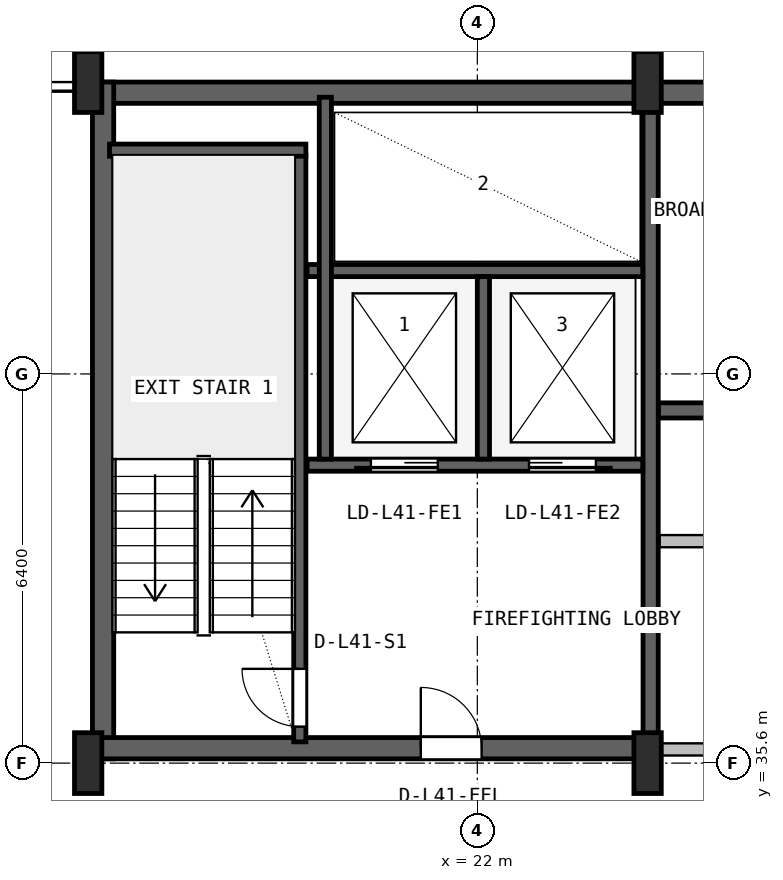
"""IFC4 building model, lengths in metres.
Left out: names, types, materials, properties, quantities, classifications, styles, units other than length and angle.
Written with IfcOpenShell. Run it as: python <this file> out.ifc"""

import sys

from ifc_helpers import new_model, si_unit, direction, frame, frame_2d, origin, origin_2d, place, context, subcontext, project, spatial, rectangle, i_section, extrude, source, transform, mapped, element, fill, save


model = new_model("IFC4")
c1 = context("Model", 3, precision=1e-05, world=origin(), true_north=direction((0.0, 1.0)))
c2 = subcontext(c1, "Body", "Model", "MODEL_VIEW")
j1 = project(units=[si_unit("LENGTHUNIT", "METRE"), si_unit("PLANEANGLEUNIT", "RADIAN")], contexts=[c1])
p1 = place(None, origin())
s1 = spatial("IfcSite", under=j1, at=p1, CompositionType="ELEMENT")
p2 = place(p1, origin())
s2 = spatial("IfcBuilding", under=s1, at=p2, CompositionType="ELEMENT")
p3 = place(p2, frame((0.0, 0.0, 168.6)))
s3 = spatial("IfcBuildingStorey", under=s2, at=p3, CompositionType="ELEMENT", Elevation=168.6)
p4 = place(p3, frame((15.6, 46.625, 0.0), z_axis=(0.0, 0.0, 1.0), x_axis=(1.0, 0.0, 0.0)))
e1 = element("IfcWall", 1, at=p4, inside=s3, PredefinedType="SHEAR", context=c2, shape_type="SweptSolid", body=[
    extrude(rectangle(XDim=36.8, YDim=0.35, at=frame_2d((18.4, 0.0))), origin(), (0.0, 0.0, 1.0), 3.55),
])
p5 = place(p3, frame((15.845, 35.67, 0.0), z_axis=(0.0, 0.0, 1.0), x_axis=(0.0, 1.0, 0.0)))
e2 = element("IfcWall", 2, at=p5, inside=s3, PredefinedType="SHEAR", context=c2, shape_type="SweptSolid", body=[
    extrude(rectangle(XDim=11.13, YDim=0.35, at=frame_2d((5.565, 0.0))), origin(), (0.0, 0.0, 1.0), 3.55),
])
p6 = place(p3, frame((15.67, 35.845, 0.0), z_axis=(0.0, 0.0, 1.0), x_axis=(1.0, 0.0, 0.0)))
e3 = element("IfcWall", 3, at=p6, inside=s3, PredefinedType="SHEAR", context=c2, shape_type="SweptSolid", body=[
    extrude(rectangle(XDim=9.13, YDim=0.35, at=frame_2d((4.565, 0.0))), origin(), (0.0, 0.0, 1.0), 3.55),
])
p7 = place(p6, frame((5.4, 0.0, 0.0)))
e4 = element("IfcOpeningElement", 4, at=p7, cuts=e3, PredefinedType="OPENING", context=c2, shape_type="SweptSolid", body=[
    extrude(rectangle(XDim=1.0, YDim=2.1, at=frame_2d((0.5, 1.05))), frame((0.0, 0.185, 0.0), z_axis=(0.0, -1.0, 0.0), x_axis=(1.0, 0.0, 0.0)), (0.0, 0.0, 1.0), 0.37),
])
m1 = source(origin(), c2, "Body", "SweptSolid", [
    extrude(i_section(OverallWidth=0.45, OverallDepth=1.0, WebThickness=0.016, FlangeThickness=0.03, FilletRadius=0.016, at=origin_2d()), origin(), (0.0, 0.0, 1.0), 3.8),
])
for number, where, z_axis, x_axis in (
    (5, (15.6, 35.6, 0.0), (0.0, 0.0, 1.0), (1.0, 0.0, 0.0)),
    (6, (15.6, 46.8, 0.0), (0.0, 0.0, 1.0), (1.0, 0.0, 0.0)),
    (7, (24.8, 35.6, 0.0), (0.0, 0.0, 1.0), (1.0, 0.0, 0.0)),
    (8, (24.8, 46.8, 0.0), (0.0, 0.0, 1.0), (1.0, 0.0, 0.0)),
):
    element("IfcColumn", number, at=place(p3, frame(where, z_axis=z_axis, x_axis=x_axis)), inside=s3, PredefinedType="COLUMN", context=c2, shape_type="MappedRepresentation", body=[
        mapped(m1, transform((0.0, 0.0, 0.0), x_axis=(1.0, 0.0, 0.0), y_axis=(0.0, 1.0, 0.0), z_axis=(0.0, 0.0, 1.0), scale=1.0)),
    ])
p8 = place(p3, frame((19.08, 35.95, 0.0), z_axis=(0.0, 0.0, 1.0), x_axis=(0.0, 1.0, 0.0)))
e9 = element("IfcWall", 9, at=p8, inside=s3, PredefinedType="SHEAR", context=c2, shape_type="SweptSolid", body=[
    extrude(rectangle(XDim=9.65, YDim=0.2, at=frame_2d((4.825, 0.0))), origin(), (0.0, 0.0, 1.0), 3.55),
])
p9 = place(p8, frame((0.25, 0.0, 0.0)))
e10 = element("IfcOpeningElement", 10, at=p9, cuts=e9, PredefinedType="OPENING", context=c2, shape_type="SweptSolid", body=[
    extrude(rectangle(XDim=0.95, YDim=2.1, at=frame_2d((0.475, 1.05))), frame((0.0, 0.11, 0.0), z_axis=(0.0, -1.0, 0.0), x_axis=(1.0, 0.0, 0.0)), (0.0, 0.0, 1.0), 0.22),
])
p10 = place(p3, frame((15.95, 45.68, 0.0), z_axis=(0.0, 0.0, 1.0), x_axis=(1.0, 0.0, 0.0)))
e11 = element("IfcWall", 11, at=p10, inside=s3, PredefinedType="SHEAR", context=c2, shape_type="SweptSolid", body=[
    extrude(rectangle(XDim=3.23, YDim=0.2, at=frame_2d((1.615, 0.0))), origin(), (0.0, 0.0, 1.0), 3.55),
])
p11 = place(p3, frame((24.85, 36.05, 0.0), z_axis=(0.0, 0.0, 1.0), x_axis=(0.0, 1.0, 0.0)))
e12 = element("IfcWall", 12, at=p11, inside=s3, PredefinedType="SHEAR", context=c2, shape_type="SweptSolid", body=[
    extrude(rectangle(XDim=10.45, YDim=0.25, at=frame_2d((5.225, 0.0))), origin(), (0.0, 0.0, 1.0), 3.55),
])
p12 = place(p3, frame((19.2, 40.5, 0.0), z_axis=(0.0, 0.0, 1.0), x_axis=(1.0, 0.0, 0.0)))
e13 = element("IfcWall", 13, at=p12, inside=s3, PredefinedType="SHEAR", context=c2, shape_type="SweptSolid", body=[
    extrude(rectangle(XDim=5.52, YDim=0.2, at=frame_2d((2.76, 0.0))), origin(), (0.0, 0.0, 1.0), 3.55),
])
p13 = place(p12, frame((1.05, 0.0, 0.0)))
e14 = element("IfcOpeningElement", 14, at=p13, cuts=e13, PredefinedType="OPENING", context=c2, shape_type="SweptSolid", body=[
    extrude(rectangle(XDim=1.1, YDim=2.18, at=frame_2d((0.55, 1.09))), frame((0.0, 0.11, 0.0), z_axis=(0.0, -1.0, 0.0), x_axis=(1.0, 0.0, 0.0)), (0.0, 0.0, 1.0), 0.22),
])
p14 = place(p12, frame((3.65, 0.0, 0.0)))
e15 = element("IfcOpeningElement", 15, at=p14, cuts=e13, PredefinedType="OPENING", context=c2, shape_type="SweptSolid", body=[
    extrude(rectangle(XDim=1.1, YDim=2.18, at=frame_2d((0.55, 1.09))), frame((0.0, 0.11, 0.0), z_axis=(0.0, -1.0, 0.0), x_axis=(1.0, 0.0, 0.0)), (0.0, 0.0, 1.0), 0.22),
])
p15 = place(p3, frame((19.2, 43.7, 0.0), z_axis=(0.0, 0.0, 1.0), x_axis=(1.0, 0.0, 0.0)))
e16 = element("IfcWall", 16, at=p15, inside=s3, PredefinedType="SHEAR", context=c2, shape_type="SweptSolid", body=[
    extrude(rectangle(XDim=5.52, YDim=0.2, at=frame_2d((2.76, 0.0))), origin(), (0.0, 0.0, 1.0), 3.55),
])
p16 = place(p3, frame((22.1, 40.6, 0.0), z_axis=(0.0, 0.0, 1.0), x_axis=(0.0, 1.0, 0.0)))
e17 = element("IfcWall", 17, at=p16, inside=s3, PredefinedType="SHEAR", context=c2, shape_type="SweptSolid", body=[
    extrude(rectangle(XDim=3.0, YDim=0.2, at=frame_2d((1.5, 0.0))), origin(), (0.0, 0.0, 1.0), 3.55),
])
p17 = place(p3, frame((19.5, 40.6, 0.0), z_axis=(0.0, 0.0, 1.0), x_axis=(0.0, 1.0, 0.0)))
e18 = element("IfcWall", 18, at=p17, inside=s3, PredefinedType="SHEAR", context=c2, shape_type="SweptSolid", body=[
    extrude(rectangle(XDim=5.95, YDim=0.2, at=frame_2d((2.975, 0.0))), origin(), (0.0, 0.0, 1.0), 3.55),
])
p18 = place(p3, frame((24.98, 41.4, 0.0), z_axis=(0.0, 0.0, 1.0), x_axis=(1.0, 0.0, 0.0)))
e19 = element("IfcWall", 19, at=p18, inside=s3, PredefinedType="SHEAR", context=c2, shape_type="SweptSolid", body=[
    extrude(rectangle(XDim=23.82, YDim=0.25, at=frame_2d((11.91, 0.0))), origin(), (0.0, 0.0, 1.0), 3.55),
])
p19 = place(p18, frame((8.87, 0.0, 0.0)))
e20 = element("IfcOpeningElement", 20, at=p19, cuts=e19, PredefinedType="OPENING", context=c2, shape_type="SweptSolid", body=[
    extrude(rectangle(XDim=1.1, YDim=2.18, at=frame_2d((0.55, 1.09))), frame((0.0, 0.135, 0.0), z_axis=(0.0, -1.0, 0.0), x_axis=(1.0, 0.0, 0.0)), (0.0, 0.0, 1.0), 0.27),
])
p20 = place(p18, frame((11.47, 0.0, 0.0)))
e21 = element("IfcOpeningElement", 21, at=p20, cuts=e19, PredefinedType="OPENING", context=c2, shape_type="SweptSolid", body=[
    extrude(rectangle(XDim=1.1, YDim=2.18, at=frame_2d((0.55, 1.09))), frame((0.0, 0.135, 0.0), z_axis=(0.0, -1.0, 0.0), x_axis=(1.0, 0.0, 0.0)), (0.0, 0.0, 1.0), 0.27),
])
p21 = place(p18, frame((14.07, 0.0, 0.0)))
e22 = element("IfcOpeningElement", 22, at=p21, cuts=e19, PredefinedType="OPENING", context=c2, shape_type="SweptSolid", body=[
    extrude(rectangle(XDim=1.1, YDim=2.18, at=frame_2d((0.55, 1.09))), frame((0.0, 0.135, 0.0), z_axis=(0.0, -1.0, 0.0), x_axis=(1.0, 0.0, 0.0)), (0.0, 0.0, 1.0), 0.27),
])
p22 = place(p18, frame((3.56, 0.0, 0.0)))
e23 = element("IfcOpeningElement", 23, at=p22, cuts=e19, PredefinedType="OPENING", context=c2, shape_type="SweptSolid", body=[
    extrude(rectangle(XDim=1.0, YDim=2.08, at=frame_2d((0.5, 1.04))), frame((0.0, 0.135, 0.0), z_axis=(0.0, -1.0, 0.0), x_axis=(1.0, 0.0, 0.0)), (0.0, 0.0, 1.0), 0.27),
])
p23 = place(p3, frame((25.0, 35.825, 0.0), z_axis=(0.0, 0.0, 1.0), x_axis=(1.0, 0.0, 0.0)))
e24 = element("IfcWall", 24, at=p23, inside=s3, PredefinedType="PLUMBINGWALL", context=c2, shape_type="SweptSolid", body=[
    extrude(rectangle(XDim=9.75, YDim=0.2, at=frame_2d((4.875, 0.0))), origin(), (0.0, 0.0, 1.0), 2.575),
])
p24 = place(p3, frame((25.0, 39.25, 0.0), z_axis=(0.0, 0.0, 1.0), x_axis=(1.0, 0.0, 0.0)))
e25 = element("IfcWall", 25, at=p24, inside=s3, PredefinedType="PLUMBINGWALL", context=c2, shape_type="SweptSolid", body=[
    extrude(rectangle(XDim=9.75, YDim=0.2, at=frame_2d((4.875, 0.0))), origin(), (0.0, 0.0, 1.0), 3.53),
])
p25 = place(p24, frame((1.75, 0.0, 0.0)))
e26 = element("IfcOpeningElement", 26, at=p25, cuts=e25, PredefinedType="OPENING", context=c2, shape_type="SweptSolid", body=[
    extrude(rectangle(XDim=0.9, YDim=2.06, at=frame_2d((0.45, 1.03))), frame((0.0, 0.11, 0.0), z_axis=(0.0, -1.0, 0.0), x_axis=(1.0, 0.0, 0.0)), (0.0, 0.0, 1.0), 0.22),
])
p26 = place(p24, frame((6.725, 0.0, 0.0)))
e27 = element("IfcOpeningElement", 27, at=p26, cuts=e25, PredefinedType="OPENING", context=c2, shape_type="SweptSolid", body=[
    extrude(rectangle(XDim=0.9, YDim=2.06, at=frame_2d((0.45, 1.03))), frame((0.0, 0.11, 0.0), z_axis=(0.0, -1.0, 0.0), x_axis=(1.0, 0.0, 0.0)), (0.0, 0.0, 1.0), 0.22),
])
m2 = source(origin(), c2, "Body", "SweptSolid", [
    extrude(rectangle(XDim=0.95, YDim=2.1, at=frame_2d((0.475, 1.05))), frame((0.0, 0.025, 0.0), z_axis=(0.0, -1.0, 0.0), x_axis=(1.0, 0.0, 0.0)), (0.0, 0.0, 1.0), 0.05),
])
p27 = place(p9, origin())
e28 = element("IfcDoor", 28, at=p27, inside=s3, OperationType="SINGLE_SWING_RIGHT", PredefinedType="DOOR", context=c2, shape_type="MappedRepresentation", body=[
    mapped(m2, transform((0.0, 0.0, 0.0), x_axis=(1.0, 0.0, 0.0), y_axis=(0.0, 1.0, 0.0), z_axis=(0.0, 0.0, 1.0), scale=1.0)),
])
fill(e10, e28)
m3 = source(origin(), c2, "Body", "SweptSolid", [
    extrude(rectangle(XDim=1.0, YDim=2.1, at=frame_2d((0.5, 1.05))), frame((0.0, 0.025, 0.0), z_axis=(0.0, -1.0, 0.0), x_axis=(1.0, 0.0, 0.0)), (0.0, 0.0, 1.0), 0.05),
])
p28 = place(p7, origin())
e29 = element("IfcDoor", 29, at=p28, inside=s3, OperationType="SINGLE_SWING_LEFT", PredefinedType="DOOR", context=c2, shape_type="MappedRepresentation", body=[
    mapped(m3, transform((0.0, 0.0, 0.0), x_axis=(1.0, 0.0, 0.0), y_axis=(0.0, 1.0, 0.0), z_axis=(0.0, 0.0, 1.0), scale=1.0)),
])
fill(e4, e29)
m4 = source(origin(), c2, "Body", "SweptSolid", [
    extrude(rectangle(XDim=1.1, YDim=2.18, at=frame_2d((0.55, 1.09))), frame((0.0, 0.025, 0.0), z_axis=(0.0, -1.0, 0.0), x_axis=(1.0, 0.0, 0.0)), (0.0, 0.0, 1.0), 0.05),
])
p29 = place(p13, frame((1.1, 0.0, 0.0), z_axis=(0.0, 0.0, 1.0), x_axis=(-1.0, 0.0, 0.0)))
e30 = element("IfcDoor", 30, at=p29, inside=s3, OperationType="SLIDING_TO_LEFT", PredefinedType="DOOR", context=c2, shape_type="MappedRepresentation", body=[
    mapped(m4, transform((0.0, 0.0, 0.0), x_axis=(1.0, 0.0, 0.0), y_axis=(0.0, 1.0, 0.0), z_axis=(0.0, 0.0, 1.0), scale=1.0)),
])
fill(e14, e30)
p30 = place(p14, frame((1.1, 0.0, 0.0), z_axis=(0.0, 0.0, 1.0), x_axis=(-1.0, 0.0, 0.0)))
e31 = element("IfcDoor", 31, at=p30, inside=s3, OperationType="SLIDING_TO_RIGHT", PredefinedType="DOOR", context=c2, shape_type="MappedRepresentation", body=[
    mapped(m4, transform((0.0, 0.0, 0.0), x_axis=(1.0, 0.0, 0.0), y_axis=(0.0, 1.0, 0.0), z_axis=(0.0, 0.0, 1.0), scale=1.0)),
])
fill(e15, e31)
save(model, sys.argv[1])
